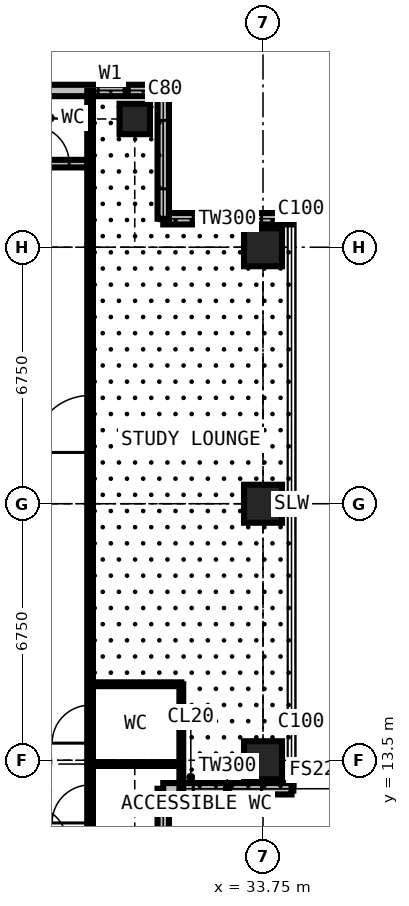
"""IFC4 building model, lengths in metres.
Left out: names, types, materials, properties, quantities, classifications, styles, units other than length and angle.
Written with IfcOpenShell. Run it as: python <this file> out.ifc"""

import sys

from ifc_helpers import new_model, si_unit, direction, frame, frame_2d, origin, origin_2d, place, context, subcontext, project, spatial, rectangle, extrude, element, fill, save


model = new_model("IFC4")
c1 = context("Model", 3, precision=1e-05, world=origin(), true_north=direction((0.0, 1.0)))
c2 = subcontext(c1, "Body", "Model", "MODEL_VIEW")
j1 = project(units=[si_unit("LENGTHUNIT", "METRE"), si_unit("PLANEANGLEUNIT", "RADIAN")], contexts=[c1])
p1 = place(None, origin())
s1 = spatial("IfcSite", under=j1, at=p1, CompositionType="ELEMENT")
p2 = place(p1, origin())
s2 = spatial("IfcBuilding", under=s1, at=p2, CompositionType="ELEMENT")
p3 = place(p2, frame((0.0, 0.0, 251.1)))
s3 = spatial("IfcBuildingStorey", under=s2, at=p3, CompositionType="ELEMENT", Elevation=251.1)
p4 = place(p3, frame((30.375, 30.375, 0.0), z_axis=(0.0, 0.0, 1.0), x_axis=(1.0, 0.0, 0.0)))
e1 = element("IfcColumn", 1, at=p4, inside=s3, PredefinedType="COLUMN", context=c2, shape_type="SweptSolid", body=[
    extrude(rectangle(XDim=0.8, YDim=0.8, at=origin_2d()), origin(), (0.0, 0.0, 1.0), 3.6),
])
for number, where, z_axis, x_axis in (
    (2, (33.75, 13.5, 0.0), (0.0, 0.0, 1.0), (1.0, 0.0, 0.0)),
    (3, (33.75, 20.25, 0.0), (0.0, 0.0, 1.0), (1.0, 0.0, 0.0)),
    (4, (33.75, 27.0, 0.0), (0.0, 0.0, 1.0), (1.0, 0.0, 0.0)),
):
    element("IfcColumn", number, at=place(p3, frame(where, z_axis=z_axis, x_axis=x_axis)), inside=s3, PredefinedType="COLUMN", context=c2, shape_type="SweptSolid", body=[
        extrude(rectangle(XDim=1.0, YDim=1.0, at=origin_2d()), origin(), (0.0, 0.0, 1.0), 3.6),
    ])
p5 = place(p3, frame((34.5, 27.75, 0.0), z_axis=(0.0, 0.0, 1.0), x_axis=(-1.0, 0.0, 0.0)))
e5 = element("IfcWall", 5, at=p5, inside=s3, PredefinedType="SOLIDWALL", context=c2, shape_type="SweptSolid", body=[
    extrude(rectangle(XDim=3.375, YDim=0.3, at=frame_2d((1.688, 0.0))), origin(), (0.0, 0.0, 1.0), 3.3),
])
p6 = place(p5, frame((0.788, 0.0, 0.6)))
e6 = element("IfcOpeningElement", 6, at=p6, cuts=e5, PredefinedType="OPENING", context=c2, shape_type="SweptSolid", body=[
    extrude(rectangle(XDim=1.8, YDim=2.1, at=frame_2d((0.9, 1.05))), frame((0.0, 0.16, 0.0), z_axis=(0.0, -1.0, 0.0), x_axis=(1.0, 0.0, 0.0)), (0.0, 0.0, 1.0), 0.32),
])
p7 = place(p3, frame((31.125, 27.75, 0.0), z_axis=(0.0, 0.0, 1.0), x_axis=(0.0, 1.0, 0.0)))
e7 = element("IfcWall", 7, at=p7, inside=s3, PredefinedType="SOLIDWALL", context=c2, shape_type="SweptSolid", body=[
    extrude(rectangle(XDim=3.375, YDim=0.3, at=frame_2d((1.688, 0.0))), origin(), (0.0, 0.0, 1.0), 3.3),
])
p8 = place(p7, frame((0.788, 0.0, 0.6)))
e8 = element("IfcOpeningElement", 8, at=p8, cuts=e7, PredefinedType="OPENING", context=c2, shape_type="SweptSolid", body=[
    extrude(rectangle(XDim=1.8, YDim=2.1, at=frame_2d((0.9, 1.05))), frame((0.0, 0.16, 0.0), z_axis=(0.0, -1.0, 0.0), x_axis=(1.0, 0.0, 0.0)), (0.0, 0.0, 1.0), 0.32),
])
p9 = place(p3, frame((31.125, 31.125, 0.0), z_axis=(0.0, 0.0, 1.0), x_axis=(-1.0, 0.0, 0.0)))
e9 = element("IfcWall", 9, at=p9, inside=s3, PredefinedType="SOLIDWALL", context=c2, shape_type="SweptSolid", body=[
    extrude(rectangle(XDim=3.375, YDim=0.3, at=frame_2d((1.688, 0.0))), origin(), (0.0, 0.0, 1.0), 3.3),
])
p10 = place(p9, frame((0.212, 0.0, 0.9)))
e10 = element("IfcOpeningElement", 10, at=p10, cuts=e9, PredefinedType="OPENING", context=c2, shape_type="SweptSolid", body=[
    extrude(rectangle(XDim=1.5, YDim=1.8, at=frame_2d((0.75, 0.9))), frame((0.0, 0.16, 0.0), z_axis=(0.0, -1.0, 0.0), x_axis=(1.0, 0.0, 0.0)), (0.0, 0.0, 1.0), 0.32),
])
p11 = place(p3, frame((31.125, 9.375, 0.0), z_axis=(0.0, 0.0, 1.0), x_axis=(0.0, 1.0, 0.0)))
e11 = element("IfcWall", 11, at=p11, inside=s3, PredefinedType="SOLIDWALL", context=c2, shape_type="SweptSolid", body=[
    extrude(rectangle(XDim=3.375, YDim=0.3, at=frame_2d((1.688, 0.0))), origin(), (0.0, 0.0, 1.0), 3.3),
])
p12 = place(p11, frame((2.2, 0.0, 0.9)))
e12 = element("IfcOpeningElement", 12, at=p12, cuts=e11, PredefinedType="OPENING", context=c2, shape_type="SweptSolid", body=[
    extrude(rectangle(XDim=0.9, YDim=1.8, at=frame_2d((0.45, 0.9))), frame((0.0, 0.16, 0.0), z_axis=(0.0, -1.0, 0.0), x_axis=(1.0, 0.0, 0.0)), (0.0, 0.0, 1.0), 0.32),
])
p13 = place(p3, frame((31.125, 12.75, 0.0), z_axis=(0.0, 0.0, 1.0), x_axis=(1.0, 0.0, 0.0)))
e13 = element("IfcWall", 13, at=p13, inside=s3, PredefinedType="SOLIDWALL", context=c2, shape_type="SweptSolid", body=[
    extrude(rectangle(XDim=3.375, YDim=0.3, at=frame_2d((1.688, 0.0))), origin(), (0.0, 0.0, 1.0), 3.3),
])
p14 = place(p13, frame((0.788, 0.0, 0.6)))
e14 = element("IfcOpeningElement", 14, at=p14, cuts=e13, PredefinedType="OPENING", context=c2, shape_type="SweptSolid", body=[
    extrude(rectangle(XDim=1.8, YDim=2.1, at=frame_2d((0.9, 1.05))), frame((0.0, 0.16, 0.0), z_axis=(0.0, -1.0, 0.0), x_axis=(1.0, 0.0, 0.0)), (0.0, 0.0, 1.0), 0.32),
])
p15 = place(p3, frame((11.3, 29.2, 0.0), z_axis=(0.0, 0.0, 1.0), x_axis=(1.0, 0.0, 0.0)))
e15 = element("IfcWall", 15, at=p15, inside=s3, PredefinedType="PARTITIONING", context=c2, shape_type="SweptSolid", body=[
    extrude(rectangle(XDim=17.9, YDim=0.2, at=frame_2d((8.95, 0.0))), origin(), (0.0, 0.0, 1.0), 3.3),
])
p16 = place(p15, frame((14.25, 0.0, 0.0)))
e16 = element("IfcOpeningElement", 16, at=p16, cuts=e15, PredefinedType="OPENING", context=c2, shape_type="SweptSolid", body=[
    extrude(rectangle(XDim=1.0, YDim=2.2, at=frame_2d((0.5, 1.1))), frame((0.0, 0.11, 0.0), z_axis=(0.0, -1.0, 0.0), x_axis=(1.0, 0.0, 0.0)), (0.0, 0.0, 1.0), 0.22),
])
p17 = place(p15, frame((16.35, 0.0, 0.0)))
e17 = element("IfcOpeningElement", 17, at=p17, cuts=e15, PredefinedType="OPENING", context=c2, shape_type="SweptSolid", body=[
    extrude(rectangle(XDim=1.0, YDim=2.2, at=frame_2d((0.5, 1.1))), frame((0.0, 0.11, 0.0), z_axis=(0.0, -1.0, 0.0), x_axis=(1.0, 0.0, 0.0)), (0.0, 0.0, 1.0), 0.22),
])
p18 = place(p15, frame((7.749, 0.0, 0.0)))
e18 = element("IfcOpeningElement", 18, at=p18, cuts=e15, PredefinedType="OPENING", context=c2, shape_type="SweptSolid", body=[
    extrude(rectangle(XDim=1.5, YDim=2.2, at=frame_2d((0.75, 1.1))), frame((0.0, 0.11, 0.0), z_axis=(0.0, -1.0, 0.0), x_axis=(1.0, 0.0, 0.0)), (0.0, 0.0, 1.0), 0.22),
])
p19 = place(p3, frame((29.2, 11.3, 0.0), z_axis=(0.0, 0.0, 1.0), x_axis=(0.0, 1.0, 0.0)))
e19 = element("IfcWall", 19, at=p19, inside=s3, PredefinedType="PARTITIONING", context=c2, shape_type="SweptSolid", body=[
    extrude(rectangle(XDim=19.809, YDim=0.15, at=frame_2d((9.904, 0.0))), origin(), (0.0, 0.0, 1.0), 3.3),
])
p20 = place(p19, frame((0.55, 0.0, 0.0)))
e20 = element("IfcOpeningElement", 20, at=p20, cuts=e19, PredefinedType="OPENING", context=c2, shape_type="SweptSolid", body=[
    extrude(rectangle(XDim=1.0, YDim=2.2, at=frame_2d((0.5, 1.1))), frame((0.0, 0.085, 0.0), z_axis=(0.0, -1.0, 0.0), x_axis=(1.0, 0.0, 0.0)), (0.0, 0.0, 1.0), 0.17),
])
p21 = place(p19, frame((2.65, 0.0, 0.0)))
e21 = element("IfcOpeningElement", 21, at=p21, cuts=e19, PredefinedType="OPENING", context=c2, shape_type="SweptSolid", body=[
    extrude(rectangle(XDim=1.0, YDim=2.2, at=frame_2d((0.5, 1.1))), frame((0.0, 0.085, 0.0), z_axis=(0.0, -1.0, 0.0), x_axis=(1.0, 0.0, 0.0)), (0.0, 0.0, 1.0), 0.17),
])
p22 = place(p19, frame((10.3, 0.0, 0.0)))
e22 = element("IfcOpeningElement", 22, at=p22, cuts=e19, PredefinedType="OPENING", context=c2, shape_type="SweptSolid", body=[
    extrude(rectangle(XDim=1.5, YDim=2.2, at=frame_2d((0.75, 1.1))), frame((0.0, 0.085, 0.0), z_axis=(0.0, -1.0, 0.0), x_axis=(1.0, 0.0, 0.0)), (0.0, 0.0, 1.0), 0.17),
])
p23 = place(p3, frame((29.2, 13.4, 0.0), z_axis=(0.0, 0.0, 1.0), x_axis=(1.0, 0.0, 0.0)))
e23 = element("IfcWall", 23, at=p23, inside=s3, PredefinedType="PARTITIONING", context=c2, shape_type="SweptSolid", body=[
    extrude(rectangle(XDim=2.4, YDim=0.1, at=frame_2d((1.2, 0.0))), origin(), (0.0, 0.0, 1.0), 2.802),
])
p24 = place(p3, frame((29.2, 15.5, 0.0), z_axis=(0.0, 0.0, 1.0), x_axis=(1.0, 0.0, 0.0)))
e24 = element("IfcWall", 24, at=p24, inside=s3, PredefinedType="PARTITIONING", context=c2, shape_type="SweptSolid", body=[
    extrude(rectangle(XDim=2.4, YDim=0.1, at=frame_2d((1.2, 0.0))), origin(), (0.0, 0.0, 1.0), 3.3),
])
p25 = place(p3, frame((31.6, 12.766, 0.0), z_axis=(0.0, 0.0, 1.0), x_axis=(0.0, 1.0, 0.0)))
e25 = element("IfcWall", 25, at=p25, inside=s3, PredefinedType="PARTITIONING", context=c2, shape_type="SweptSolid", body=[
    extrude(rectangle(XDim=2.734, YDim=0.1, at=frame_2d((1.367, 0.0))), origin(), (0.0, 0.0, 1.0), 3.3),
])
p26 = place(p6, origin())
e26 = element("IfcWindow", 26, at=p26, inside=s3, PartitioningType="SINGLE_PANEL", PredefinedType="WINDOW", context=c2, shape_type="SweptSolid", body=[
    extrude(rectangle(XDim=1.8, YDim=2.1, at=frame_2d((0.9, 1.05))), frame((0.0, 0.03, 0.0), z_axis=(0.0, -1.0, 0.0), x_axis=(1.0, 0.0, 0.0)), (0.0, 0.0, 1.0), 0.06),
])
fill(e6, e26)
p27 = place(p8, origin())
e27 = element("IfcWindow", 27, at=p27, inside=s3, PartitioningType="SINGLE_PANEL", PredefinedType="WINDOW", context=c2, shape_type="SweptSolid", body=[
    extrude(rectangle(XDim=1.8, YDim=2.1, at=frame_2d((0.9, 1.05))), frame((0.0, 0.03, 0.0), z_axis=(0.0, -1.0, 0.0), x_axis=(1.0, 0.0, 0.0)), (0.0, 0.0, 1.0), 0.06),
])
fill(e8, e27)
p28 = place(p10, origin())
e28 = element("IfcWindow", 28, at=p28, inside=s3, PartitioningType="SINGLE_PANEL", PredefinedType="WINDOW", context=c2, shape_type="SweptSolid", body=[
    extrude(rectangle(XDim=1.5, YDim=1.8, at=frame_2d((0.75, 0.9))), frame((0.0, 0.03, 0.0), z_axis=(0.0, -1.0, 0.0), x_axis=(1.0, 0.0, 0.0)), (0.0, 0.0, 1.0), 0.06),
])
fill(e10, e28)
p29 = place(p12, origin())
e29 = element("IfcWindow", 29, at=p29, inside=s3, PartitioningType="SINGLE_PANEL", PredefinedType="WINDOW", context=c2, shape_type="SweptSolid", body=[
    extrude(rectangle(XDim=0.9, YDim=1.8, at=frame_2d((0.45, 0.9))), frame((0.0, 0.03, 0.0), z_axis=(0.0, -1.0, 0.0), x_axis=(1.0, 0.0, 0.0)), (0.0, 0.0, 1.0), 0.06),
])
fill(e12, e29)
p30 = place(p14, origin())
e30 = element("IfcWindow", 30, at=p30, inside=s3, PartitioningType="SINGLE_PANEL", PredefinedType="WINDOW", context=c2, shape_type="SweptSolid", body=[
    extrude(rectangle(XDim=1.8, YDim=2.1, at=frame_2d((0.9, 1.05))), frame((0.0, 0.03, 0.0), z_axis=(0.0, -1.0, 0.0), x_axis=(1.0, 0.0, 0.0)), (0.0, 0.0, 1.0), 0.06),
])
fill(e14, e30)
p31 = place(p20, origin())
e31 = element("IfcDoor", 31, at=p31, inside=s3, OperationType="SINGLE_SWING_LEFT", PredefinedType="DOOR", context=c2, shape_type="SweptSolid", body=[
    extrude(rectangle(XDim=1.0, YDim=2.2, at=frame_2d((0.5, 1.1))), frame((0.0, 0.025, 0.0), z_axis=(0.0, -1.0, 0.0), x_axis=(1.0, 0.0, 0.0)), (0.0, 0.0, 1.0), 0.05),
])
fill(e20, e31)
p32 = place(p21, origin())
e32 = element("IfcDoor", 32, at=p32, inside=s3, OperationType="SINGLE_SWING_LEFT", PredefinedType="DOOR", context=c2, shape_type="SweptSolid", body=[
    extrude(rectangle(XDim=1.0, YDim=2.2, at=frame_2d((0.5, 1.1))), frame((0.0, 0.025, 0.0), z_axis=(0.0, -1.0, 0.0), x_axis=(1.0, 0.0, 0.0)), (0.0, 0.0, 1.0), 0.05),
])
fill(e21, e32)
p33 = place(p22, origin())
e33 = element("IfcDoor", 33, at=p33, inside=s3, OperationType="DOUBLE_DOOR_SINGLE_SWING", PredefinedType="DOOR", context=c2, shape_type="SweptSolid", body=[
    extrude(rectangle(XDim=1.5, YDim=2.2, at=frame_2d((0.75, 1.1))), frame((0.0, 0.025, 0.0), z_axis=(0.0, -1.0, 0.0), x_axis=(1.0, 0.0, 0.0)), (0.0, 0.0, 1.0), 0.05),
])
fill(e22, e33)
p34 = place(p17, origin())
e34 = element("IfcDoor", 34, at=p34, inside=s3, OperationType="SINGLE_SWING_LEFT", PredefinedType="DOOR", context=c2, shape_type="SweptSolid", body=[
    extrude(rectangle(XDim=1.0, YDim=2.2, at=frame_2d((0.5, 1.1))), frame((0.0, 0.025, 0.0), z_axis=(0.0, -1.0, 0.0), x_axis=(1.0, 0.0, 0.0)), (0.0, 0.0, 1.0), 0.05),
])
fill(e17, e34)
save(model, sys.argv[1])
